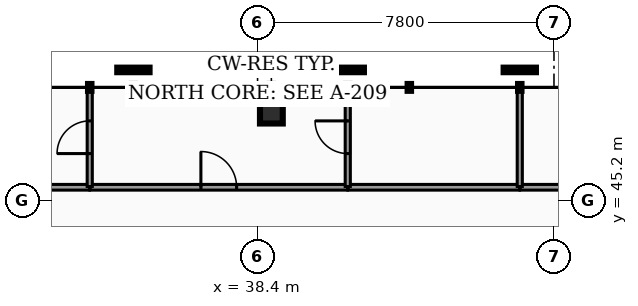
"""IFC4 building model, lengths in metres.
Left out: names, types, materials, properties, quantities, classifications, styles, units other than length and angle.
Written with IfcOpenShell. Run it as: python <this file> out.ifc"""

import sys

from ifc_helpers import new_model, si_unit, direction, frame, frame_2d, origin, origin_2d, place, context, subcontext, project, spatial, rectangle, hollow_rectangle, extrude, element, fill, save


model = new_model("IFC4")
c1 = context("Model", 3, precision=1e-05, world=origin(), true_north=direction((0.0, 1.0)))
c2 = subcontext(c1, "Body", "Model", "MODEL_VIEW")
j1 = project(units=[si_unit("LENGTHUNIT", "METRE"), si_unit("PLANEANGLEUNIT", "RADIAN")], contexts=[c1])
p1 = place(None, origin())
s1 = spatial("IfcSite", under=j1, at=p1, CompositionType="ELEMENT")
p2 = place(p1, origin())
s2 = spatial("IfcBuilding", under=s1, at=p2, CompositionType="ELEMENT")
p3 = place(p2, frame((0.0, 0.0, 229.16)))
s3 = spatial("IfcBuildingStorey", under=s2, at=p3, CompositionType="ELEMENT", Elevation=229.16)
p4 = place(p3, frame((38.763, 47.528, 0.0), z_axis=(0.0, 0.0, 1.0), x_axis=(1.0, 0.0, 0.0)))
e1 = element("IfcColumn", 1, at=p4, inside=s3, PredefinedType="COLUMN", context=c2, shape_type="SweptSolid", body=[
    extrude(hollow_rectangle(XDim=0.6, YDim=0.6, WallThickness=0.03, at=origin_2d()), origin(), (0.0, 0.0, 1.0), 3.18),
])
p5 = place(p3, frame((45.305, 45.55, 0.0), z_axis=(0.0, 0.0, 1.0), x_axis=(1.0, 0.0, 0.0)))
e2 = element("IfcWall", 2, at=p5, inside=s3, PredefinedType="PARTITIONING", context=c2, shape_type="SweptSolid", body=[
    extrude(rectangle(XDim=3.045, YDim=0.15, at=frame_2d((1.522, 0.0))), origin(), (0.0, 0.0, 1.0), 2.235),
])
p6 = place(p3, frame((33.989, 45.55, 0.0), z_axis=(0.0, 0.0, 1.0), x_axis=(1.0, 0.0, 0.0)))
e3 = element("IfcWall", 3, at=p6, inside=s3, PredefinedType="PARTITIONING", context=c2, shape_type="SweptSolid", body=[
    extrude(rectangle(XDim=6.78, YDim=0.15, at=frame_2d((3.39, 0.0))), origin(), (0.0, 0.0, 1.0), 2.235),
])
p7 = place(p6, frame((2.92, 0.0, 0.0)))
e4 = element("IfcOpeningElement", 4, at=p7, cuts=e3, PredefinedType="OPENING", context=c2, shape_type="SweptSolid", body=[
    extrude(rectangle(XDim=0.94, YDim=2.05, at=frame_2d((0.47, 1.025))), frame((0.0, 0.085, 0.0), z_axis=(0.0, -1.0, 0.0), x_axis=(1.0, 0.0, 0.0)), (0.0, 0.0, 1.0), 0.17),
])
p8 = place(p3, frame((40.779, 45.55, 0.0), z_axis=(0.0, 0.0, 1.0), x_axis=(1.0, 0.0, 0.0)))
e5 = element("IfcWall", 5, at=p8, inside=s3, PredefinedType="PARTITIONING", context=c2, shape_type="SweptSolid", body=[
    extrude(rectangle(XDim=4.516, YDim=0.15, at=frame_2d((2.258, 0.0))), origin(), (0.0, 0.0, 1.0), 2.235),
])
p9 = place(p3, frame((31.505, 45.55, 0.0), z_axis=(0.0, 0.0, 1.0), x_axis=(1.0, 0.0, 0.0)))
e6 = element("IfcWall", 6, at=p9, inside=s3, PredefinedType="PARTITIONING", context=c2, shape_type="SweptSolid", body=[
    extrude(rectangle(XDim=2.474, YDim=0.15, at=frame_2d((1.237, 0.0))), origin(), (0.0, 0.0, 1.0), 2.235),
])
p10 = place(p3, frame((45.3, 45.57, 0.0), z_axis=(0.0, 0.0, 1.0), x_axis=(0.0, 1.0, 0.0)))
e7 = element("IfcWall", 7, at=p10, inside=s3, PredefinedType="PARTITIONING", context=c2, shape_type="SweptSolid", body=[
    extrude(rectangle(XDim=2.593, YDim=0.135, at=frame_2d((1.296, 0.0))), origin(), (0.0, 0.0, 1.0), 2.235),
])
p11 = place(p3, frame((40.774, 45.57, 0.0), z_axis=(0.0, 0.0, 1.0), x_axis=(0.0, 1.0, 0.0)))
e8 = element("IfcWall", 8, at=p11, inside=s3, PredefinedType="PARTITIONING", context=c2, shape_type="SweptSolid", body=[
    extrude(rectangle(XDim=2.593, YDim=0.135, at=frame_2d((1.296, 0.0))), origin(), (0.0, 0.0, 1.0), 2.235),
])
p12 = place(p11, frame((0.866, 0.0, 0.0)))
e9 = element("IfcOpeningElement", 9, at=p12, cuts=e8, PredefinedType="OPENING", context=c2, shape_type="SweptSolid", body=[
    extrude(rectangle(XDim=0.86, YDim=2.05, at=frame_2d((0.43, 1.025))), frame((0.0, 0.077, 0.0), z_axis=(0.0, -1.0, 0.0), x_axis=(1.0, 0.0, 0.0)), (0.0, 0.0, 1.0), 0.155),
])
p13 = place(p3, frame((33.984, 45.57, 0.0), z_axis=(0.0, 0.0, 1.0), x_axis=(0.0, 1.0, 0.0)))
e10 = element("IfcWall", 10, at=p13, inside=s3, PredefinedType="PARTITIONING", context=c2, shape_type="SweptSolid", body=[
    extrude(rectangle(XDim=2.593, YDim=0.135, at=frame_2d((1.296, 0.0))), origin(), (0.0, 0.0, 1.0), 2.235),
])
p14 = place(p13, frame((0.866, 0.0, 0.0)))
e11 = element("IfcOpeningElement", 11, at=p14, cuts=e10, PredefinedType="OPENING", context=c2, shape_type="SweptSolid", body=[
    extrude(rectangle(XDim=0.86, YDim=2.05, at=frame_2d((0.43, 1.025))), frame((0.0, 0.077, 0.0), z_axis=(0.0, -1.0, 0.0), x_axis=(1.0, 0.0, 0.0)), (0.0, 0.0, 1.0), 0.155),
])
p15 = place(p7, origin())
e12 = element("IfcDoor", 12, at=p15, inside=s3, OperationType="SINGLE_SWING_LEFT", PredefinedType="DOOR", context=c2, shape_type="SweptSolid", body=[
    extrude(rectangle(XDim=0.94, YDim=2.05, at=frame_2d((0.47, 1.025))), frame((0.0, 0.025, 0.0), z_axis=(0.0, -1.0, 0.0), x_axis=(1.0, 0.0, 0.0)), (0.0, 0.0, 1.0), 0.05),
])
fill(e4, e12)
p16 = place(p12, origin())
e13 = element("IfcDoor", 13, at=p16, inside=s3, OperationType="SINGLE_SWING_RIGHT", PredefinedType="DOOR", context=c2, shape_type="SweptSolid", body=[
    extrude(rectangle(XDim=0.86, YDim=2.05, at=frame_2d((0.43, 1.025))), frame((0.0, 0.025, 0.0), z_axis=(0.0, -1.0, 0.0), x_axis=(1.0, 0.0, 0.0)), (0.0, 0.0, 1.0), 0.05),
])
fill(e9, e13)
p17 = place(p14, origin())
e14 = element("IfcDoor", 14, at=p17, inside=s3, OperationType="SINGLE_SWING_LEFT", PredefinedType="DOOR", context=c2, shape_type="SweptSolid", body=[
    extrude(rectangle(XDim=0.86, YDim=2.05, at=frame_2d((0.43, 1.025))), frame((0.0, 0.025, 0.0), z_axis=(0.0, -1.0, 0.0), x_axis=(1.0, 0.0, 0.0)), (0.0, 0.0, 1.0), 0.05),
])
fill(e11, e14)
save(model, sys.argv[1])
